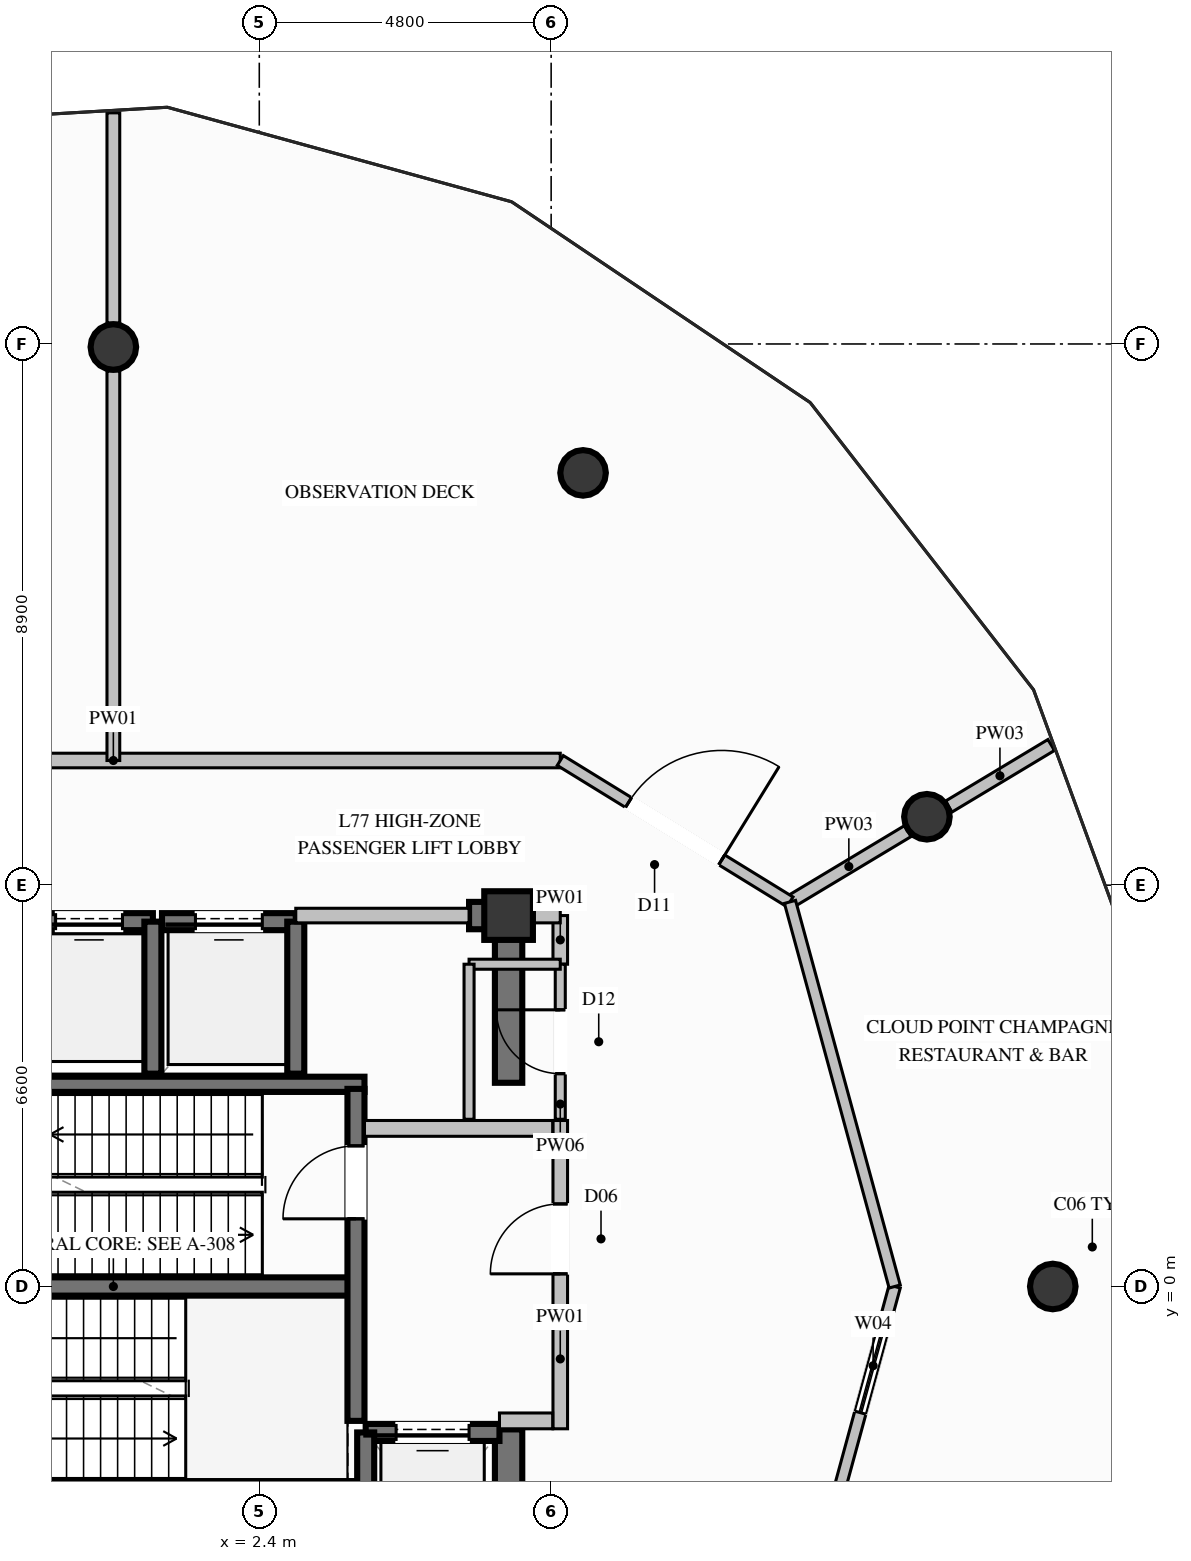
"""IFC4 building model, lengths in metres.
Left out: names, types, materials, properties, quantities, classifications, styles, units other than length and angle.
Written with IfcOpenShell. Run it as: python <this file> out.ifc"""

import sys

from ifc_helpers import new_model, si_unit, direction, frame, frame_2d, origin, origin_2d, place, context, subcontext, project, spatial, rectangle, circle, extrude, element, fill, save


model = new_model("IFC4")
c1 = context("Model", 3, precision=1e-05, world=origin(), true_north=direction((0.0, 1.0)))
c2 = subcontext(c1, "Body", "Model", "MODEL_VIEW")
j1 = project(units=[si_unit("LENGTHUNIT", "METRE"), si_unit("PLANEANGLEUNIT", "RADIAN")], contexts=[c1])
p1 = place(None, origin())
s1 = spatial("IfcSite", under=j1, at=p1, CompositionType="ELEMENT")
p2 = place(p1, origin())
s2 = spatial("IfcBuilding", under=s1, at=p2, CompositionType="ELEMENT")
p3 = place(p2, frame((0.0, 0.0, 297.2)))
s3 = spatial("IfcBuildingStorey", under=s2, at=p3, CompositionType="ELEMENT", Elevation=297.2)
p4 = place(p3, frame((6.5, 6.1, 0.0), z_axis=(0.0, 0.0, 1.0), x_axis=(1.0, 0.0, 0.0)))
e1 = element("IfcColumn", 1, at=p4, inside=s3, PredefinedType="COLUMN", context=c2, shape_type="SweptSolid", body=[
    extrude(rectangle(XDim=0.8, YDim=0.8, at=origin_2d()), origin(), (0.0, 0.0, 1.0), 5.0),
])
p5 = place(p3, frame((-3.99, 0.0, 0.0), z_axis=(0.0, 0.0, 1.0), x_axis=(1.0, 0.0, 0.0)))
e2 = element("IfcWall", 2, at=p5, inside=s3, PredefinedType="SHEAR", context=c2, shape_type="SweptSolid", body=[
    extrude(rectangle(XDim=7.98, YDim=0.3, at=frame_2d((3.99, 0.0))), origin(), (0.0, 0.0, 1.0), 5.0),
])
for number, where, z_axis, x_axis in (
    (3, (-4.13, -3.325, 0.0), (0.0, 0.0, 1.0), (1.0, 0.0, 0.0)),
    (4, (-4.13, 3.325, 0.0), (0.0, 0.0, 1.0), (1.0, 0.0, 0.0)),
):
    element("IfcWall", number, at=place(p3, frame(where, z_axis=z_axis, x_axis=x_axis)), inside=s3, PredefinedType="SOLIDWALL", context=c2, shape_type="SweptSolid", body=[
        extrude(rectangle(XDim=8.26, YDim=0.25, at=frame_2d((4.13, 0.0))), origin(), (0.0, 0.0, 1.0), 5.0),
    ])
p6 = place(p3, frame((5.85, 6.1, 0.0), z_axis=(0.0, 0.0, 1.0), x_axis=(1.0, 0.0, 0.0)))
e5 = element("IfcWall", 5, at=p6, inside=s3, PredefinedType="SHEAR", context=c2, shape_type="SweptSolid", body=[
    extrude(rectangle(XDim=0.425, YDim=0.45, at=frame_2d((0.212, 0.0))), origin(), (0.0, 0.0, 1.0), 5.0),
])
p7 = place(p3, frame((6.5, -6.325, 0.0), z_axis=(0.0, 0.0, 1.0), x_axis=(0.0, 1.0, 0.0)))
e6 = element("IfcWall", 6, at=p7, inside=s3, PredefinedType="SHEAR", context=c2, shape_type="SweptSolid", body=[
    extrude(rectangle(XDim=3.975, YDim=0.45, at=frame_2d((1.987, 0.0))), origin(), (0.0, 0.0, 1.0), 5.0),
])
p8 = place(p3, frame((6.5, 3.35, 0.0), z_axis=(0.0, 0.0, 1.0), x_axis=(0.0, 1.0, 0.0)))
e7 = element("IfcWall", 7, at=p8, inside=s3, PredefinedType="SHEAR", context=c2, shape_type="SweptSolid", body=[
    extrude(rectangle(XDim=2.975, YDim=0.45, at=frame_2d((1.487, 0.0))), origin(), (0.0, 0.0, 1.0), 5.0),
])
for number, where, z_axis, x_axis in (
    (8, (15.45, 0.0, 0.0), (0.0, 0.0, 1.0), (1.0, 0.0, 0.0)),
    (9, (13.38, 7.725, 0.0), (0.0, 0.0, 1.0), (1.0, 0.0, 0.0)),
    (10, (7.725, 13.38, 0.0), (0.0, 0.0, 1.0), (1.0, 0.0, 0.0)),
    (11, (0.0, 15.45, 0.0), (0.0, 0.0, 1.0), (1.0, 0.0, 0.0)),
):
    element("IfcColumn", number, at=place(p3, frame(where, z_axis=z_axis, x_axis=x_axis)), inside=s3, PredefinedType="COLUMN", context=c2, shape_type="SweptSolid", body=[
        extrude(circle(Radius=0.375, at=origin_2d()), origin(), (0.0, 0.0, 1.0), 5.0),
    ])
p9 = place(p3, frame((0.65, 6.0, 0.0), z_axis=(0.0, 0.0, 1.0), x_axis=(-1.0, 0.0, 0.0)))
e12 = element("IfcWall", 12, at=p9, inside=s3, PredefinedType="SOLIDWALL", context=c2, shape_type="SweptSolid", body=[
    extrude(rectangle(XDim=2.1, YDim=0.28, at=frame_2d((1.05, 0.0))), origin(), (0.0, 0.0, 1.0), 4.72),
])
p10 = place(p9, frame((0.5, 0.0, 0.0)))
e13 = element("IfcOpeningElement", 13, at=p10, cuts=e12, PredefinedType="OPENING", context=c2, shape_type="SweptSolid", body=[
    extrude(rectangle(XDim=1.1, YDim=2.2, at=frame_2d((0.55, 1.1))), frame((0.0, 0.15, 0.0), z_axis=(0.0, -1.0, 0.0), x_axis=(1.0, 0.0, 0.0)), (0.0, 0.0, 1.0), 0.3),
])
p11 = place(p3, frame((0.65, 3.5, 0.0), z_axis=(0.0, 0.0, 1.0), x_axis=(0.0, 1.0, 0.0)))
e14 = element("IfcWall", 14, at=p11, inside=s3, PredefinedType="SOLIDWALL", context=c2, shape_type="SweptSolid", body=[
    extrude(rectangle(XDim=2.5, YDim=0.28, at=frame_2d((1.25, 0.0))), origin(), (0.0, 0.0, 1.0), 4.72),
])
p12 = place(p3, frame((3.0, 6.0, 0.0), z_axis=(0.0, 0.0, 1.0), x_axis=(-1.0, 0.0, 0.0)))
e15 = element("IfcWall", 15, at=p12, inside=s3, PredefinedType="SOLIDWALL", context=c2, shape_type="SweptSolid", body=[
    extrude(rectangle(XDim=2.2, YDim=0.28, at=frame_2d((1.1, 0.0))), origin(), (0.0, 0.0, 1.0), 4.72),
])
p13 = place(p12, frame((0.55, 0.0, 0.0)))
e16 = element("IfcOpeningElement", 16, at=p13, cuts=e15, PredefinedType="OPENING", context=c2, shape_type="SweptSolid", body=[
    extrude(rectangle(XDim=1.1, YDim=2.2, at=frame_2d((0.55, 1.1))), frame((0.0, 0.15, 0.0), z_axis=(0.0, -1.0, 0.0), x_axis=(1.0, 0.0, 0.0)), (0.0, 0.0, 1.0), 0.3),
])
p14 = place(p3, frame((3.0, 3.5, 0.0), z_axis=(0.0, 0.0, 1.0), x_axis=(0.0, 1.0, 0.0)))
e17 = element("IfcWall", 17, at=p14, inside=s3, PredefinedType="SOLIDWALL", context=c2, shape_type="SweptSolid", body=[
    extrude(rectangle(XDim=2.5, YDim=0.28, at=frame_2d((1.25, 0.0))), origin(), (0.0, 0.0, 1.0), 4.72),
])
p15 = place(p3, frame((6.35, -2.4, 0.0), z_axis=(0.0, 0.0, 1.0), x_axis=(-1.0, 0.0, 0.0)))
e18 = element("IfcWall", 18, at=p15, inside=s3, PredefinedType="SOLIDWALL", context=c2, shape_type="SweptSolid", body=[
    extrude(rectangle(XDim=2.2, YDim=0.28, at=frame_2d((1.1, 0.0))), origin(), (0.0, 0.0, 1.0), 4.72),
])
p16 = place(p15, frame((0.5, 0.0, 0.0)))
e19 = element("IfcOpeningElement", 19, at=p16, cuts=e18, PredefinedType="OPENING", context=c2, shape_type="SweptSolid", body=[
    extrude(rectangle(XDim=1.2, YDim=2.2, at=frame_2d((0.6, 1.1))), frame((0.0, 0.15, 0.0), z_axis=(0.0, -1.0, 0.0), x_axis=(1.0, 0.0, 0.0)), (0.0, 0.0, 1.0), 0.3),
])
p17 = place(p3, frame((4.15, -2.4, 0.0), z_axis=(0.0, 0.0, 1.0), x_axis=(0.0, -1.0, 0.0)))
e20 = element("IfcWall", 20, at=p17, inside=s3, PredefinedType="SOLIDWALL", context=c2, shape_type="SweptSolid", body=[
    extrude(rectangle(XDim=2.7, YDim=0.28, at=frame_2d((1.35, 0.0))), origin(), (0.0, 0.0, 1.0), 4.72),
])
p18 = place(p3, frame((3.99, -2.21, 0.0), z_axis=(0.0, 0.0, 1.0), x_axis=(0.0, 1.0, 0.0)))
e21 = element("IfcWall", 21, at=p18, inside=s3, PredefinedType="SOLIDWALL", context=c2, shape_type="SweptSolid", body=[
    extrude(rectangle(XDim=5.46, YDim=0.28, at=frame_2d((2.73, 0.0))), origin(), (0.0, 0.0, 1.0), 4.72),
])
p19 = place(p18, frame((3.323, 0.0, 0.0)))
e22 = element("IfcOpeningElement", 22, at=p19, cuts=e21, PredefinedType="OPENING", context=c2, shape_type="SweptSolid", body=[
    extrude(rectangle(XDim=1.2, YDim=2.2, at=frame_2d((0.6, 1.1))), frame((0.0, 0.15, 0.0), z_axis=(0.0, -1.0, 0.0), x_axis=(1.0, 0.0, 0.0)), (0.0, 0.0, 1.0), 0.3),
])
p20 = place(p3, frame((7.35, -2.34, 0.0), z_axis=(0.0, 0.0, 1.0), x_axis=(0.0, 1.0, 0.0)))
e23 = element("IfcWall", 23, at=p20, inside=s3, PredefinedType="PARTITIONING", context=c2, shape_type="SweptSolid", body=[
    extrude(rectangle(XDim=5.07, YDim=0.24, at=frame_2d((2.535, 0.0))), origin(), (0.0, 0.0, 1.0), 2.905),
])
p21 = place(p20, frame((2.548, 0.0, 0.0)))
e24 = element("IfcOpeningElement", 24, at=p21, cuts=e23, PredefinedType="OPENING", context=c2, shape_type="SweptSolid", body=[
    extrude(rectangle(XDim=1.15, YDim=2.2, at=frame_2d((0.575, 1.1))), frame((0.0, 0.13, 0.0), z_axis=(0.0, -1.0, 0.0), x_axis=(1.0, 0.0, 0.0)), (0.0, 0.0, 1.0), 0.26),
])
p22 = place(p3, frame((6.35, -2.21, 0.0), z_axis=(0.0, 0.0, 1.0), x_axis=(1.0, 0.0, 0.0)))
e25 = element("IfcWall", 25, at=p22, inside=s3, PredefinedType="PARTITIONING", context=c2, shape_type="SweptSolid", body=[
    extrude(rectangle(XDim=0.875, YDim=0.26, at=frame_2d((0.438, 0.0))), origin(), (0.0, 0.0, 1.0), 4.72),
])
p23 = place(p3, frame((4.13, 2.6, 0.0), z_axis=(0.0, 0.0, 1.0), x_axis=(1.0, 0.0, 0.0)))
e26 = element("IfcWall", 26, at=p23, inside=s3, PredefinedType="PARTITIONING", context=c2, shape_type="SweptSolid", body=[
    extrude(rectangle(XDim=3.095, YDim=0.26, at=frame_2d((1.548, 0.0))), origin(), (0.0, 0.0, 1.0), 4.72),
])
p24 = place(p3, frame((-7.35, 8.65, 0.0), z_axis=(0.0, 0.0, 1.0), x_axis=(1.0, 0.0, 0.0)))
e27 = element("IfcWall", 27, at=p24, inside=s3, PredefinedType="PARTITIONING", context=c2, shape_type="SweptSolid", body=[
    extrude(rectangle(XDim=14.7, YDim=0.24, at=frame_2d((7.35, 0.0))), origin(), (0.0, 0.0, 1.0), 4.72),
])
p25 = place(p3, frame((3.0, 6.1, 0.0), z_axis=(0.0, 0.0, 1.0), x_axis=(1.0, 0.0, 0.0)))
e28 = element("IfcWall", 28, at=p25, inside=s3, PredefinedType="PARTITIONING", context=c2, shape_type="SweptSolid", body=[
    extrude(rectangle(XDim=2.85, YDim=0.24, at=frame_2d((1.425, 0.0))), origin(), (0.0, 0.0, 1.0), 2.905),
])
p26 = place(p3, frame((7.35, 5.3, 0.0), z_axis=(0.0, 0.0, 1.0), x_axis=(0.0, 1.0, 0.0)))
e29 = element("IfcWall", 29, at=p26, inside=s3, PredefinedType="PARTITIONING", context=c2, shape_type="SweptSolid", body=[
    extrude(rectangle(XDim=0.8, YDim=0.24, at=frame_2d((0.4, 0.0))), origin(), (0.0, 0.0, 1.0), 2.905),
])
p27 = place(p3, frame((6.5, 6.1, 0.0), z_axis=(0.0, 0.0, 1.0), x_axis=(1.0, 0.0, 0.0)))
e30 = element("IfcWall", 30, at=p27, inside=s3, PredefinedType="PARTITIONING", context=c2, shape_type="SweptSolid", body=[
    extrude(rectangle(XDim=0.85, YDim=0.24, at=frame_2d((0.425, 0.0))), origin(), (0.0, 0.0, 1.0), 4.72),
])
p28 = place(p3, frame((7.35, 2.75, 0.0), z_axis=(0.0, 0.0, 1.0), x_axis=(0.0, 1.0, 0.0)))
e31 = element("IfcWall", 31, at=p28, inside=s3, PredefinedType="PARTITIONING", context=c2, shape_type="SweptSolid", body=[
    extrude(rectangle(XDim=2.55, YDim=0.165, at=frame_2d((1.275, 0.0))), origin(), (0.0, 0.0, 1.0), 2.905),
])
p29 = place(p28, frame((0.75, 0.0, 0.0)))
e32 = element("IfcOpeningElement", 32, at=p29, cuts=e31, PredefinedType="OPENING", context=c2, shape_type="SweptSolid", body=[
    extrude(rectangle(XDim=1.05, YDim=2.15, at=frame_2d((0.525, 1.075))), frame((0.0, 0.093, 0.0), z_axis=(0.0, -1.0, 0.0), x_axis=(1.0, 0.0, 0.0)), (0.0, 0.0, 1.0), 0.185),
])
p30 = place(p3, frame((7.35, 5.3, 0.0), z_axis=(0.0, 0.0, 1.0), x_axis=(-1.0, 0.0, 0.0)))
e33 = element("IfcWall", 33, at=p30, inside=s3, PredefinedType="PARTITIONING", context=c2, shape_type="SweptSolid", body=[
    extrude(rectangle(XDim=1.5, YDim=0.165, at=frame_2d((0.75, 0.0))), origin(), (0.0, 0.0, 1.0), 2.905),
])
p31 = place(p3, frame((5.85, 5.3, 0.0), z_axis=(0.0, 0.0, 1.0), x_axis=(0.0, -1.0, 0.0)))
e34 = element("IfcWall", 34, at=p31, inside=s3, PredefinedType="PARTITIONING", context=c2, shape_type="SweptSolid", body=[
    extrude(rectangle(XDim=2.55, YDim=0.165, at=frame_2d((1.275, 0.0))), origin(), (0.0, 0.0, 1.0), 2.905),
])
p32 = place(p3, frame((11.128, 6.325, 0.0), z_axis=(0.0, 0.0, 1.0), x_axis=(0.857206654834, 0.514972572967, 0.0)))
e35 = element("IfcWall", 35, at=p32, inside=s3, PredefinedType="PARTITIONING", context=c2, shape_type="SweptSolid", body=[
    extrude(rectangle(XDim=2.259, YDim=0.21, at=frame_2d((1.129, 0.0))), origin(), (0.0, 0.0, 1.0), 2.905),
])
p33 = place(p3, frame((13.738, 7.892, 0.0), z_axis=(0.0, 0.0, 1.0), x_axis=(0.857197078032, 0.514988513865, 0.0)))
e36 = element("IfcWall", 36, at=p33, inside=s3, PredefinedType="PARTITIONING", context=c2, shape_type="SweptSolid", body=[
    extrude(rectangle(XDim=1.967, YDim=0.21, at=frame_2d((0.983, 0.0))), origin(), (0.0, 0.0, 1.0), 4.72),
])
p34 = place(p3, frame((7.35, 8.65, 0.0), z_axis=(0.0, 0.0, 1.0), x_axis=(0.851645088617, -0.524118920699, 0.0)))
e37 = element("IfcWall", 37, at=p34, inside=s3, PredefinedType="PARTITIONING", context=c2, shape_type="SweptSolid", body=[
    extrude(rectangle(XDim=4.436, YDim=0.19, at=frame_2d((2.218, 0.0))), origin(), (0.0, 0.0, 1.0), 4.72),
])
p35 = place(p34, frame((1.318, 0.0, 0.0)))
e38 = element("IfcOpeningElement", 38, at=p35, cuts=e37, PredefinedType="OPENING", context=c2, shape_type="SweptSolid", body=[
    extrude(rectangle(XDim=1.8, YDim=2.4, at=frame_2d((0.9, 1.2))), frame((0.0, 0.105, 0.0), z_axis=(0.0, -1.0, 0.0), x_axis=(1.0, 0.0, 0.0)), (0.0, 0.0, 1.0), 0.21),
])
p36 = place(p3, frame((0.0, 8.65, 0.0), z_axis=(0.0, 0.0, 1.0), x_axis=(0.0, 1.0, 0.0)))
e39 = element("IfcWall", 39, at=p36, inside=s3, PredefinedType="PARTITIONING", context=c2, shape_type="SweptSolid", body=[
    extrude(rectangle(XDim=6.405, YDim=0.21, at=frame_2d((3.203, 0.0))), origin(), (0.0, 0.0, 1.0), 2.905),
])
p37 = place(p3, frame((0.0, 15.845, 0.0), z_axis=(0.0, 0.0, 1.0), x_axis=(0.0, 1.0, 0.0)))
e40 = element("IfcWall", 40, at=p37, inside=s3, PredefinedType="PARTITIONING", context=c2, shape_type="SweptSolid", body=[
    extrude(rectangle(XDim=3.456, YDim=0.21, at=frame_2d((1.728, 0.0))), origin(), (0.0, 0.0, 1.0), 4.72),
])
p38 = place(p3, frame((11.128, -6.325, 0.0), z_axis=(0.0, 0.0, 1.0), x_axis=(0.262717156474, 0.964872890952, 0.0)))
e41 = element("IfcWall", 41, at=p38, inside=s3, PredefinedType="PARTITIONING", context=c2, shape_type="SweptSolid", body=[
    extrude(rectangle(XDim=6.555, YDim=0.19, at=frame_2d((3.278, 0.0))), origin(), (0.0, 0.0, 1.0), 4.72),
])
p39 = place(p38, frame((0.55, 0.0, 0.0)))
e42 = element("IfcOpeningElement", 42, at=p39, cuts=e41, PredefinedType="OPENING", context=c2, shape_type="SweptSolid", body=[
    extrude(rectangle(XDim=0.95, YDim=2.1, at=frame_2d((0.475, 1.05))), frame((0.0, 0.105, 0.0), z_axis=(0.0, -1.0, 0.0), x_axis=(1.0, 0.0, 0.0)), (0.0, 0.0, 1.0), 0.21),
])
p40 = place(p38, frame((4.405, 0.0, 0.9)))
e43 = element("IfcOpeningElement", 43, at=p40, cuts=e41, PredefinedType="OPENING", context=c2, shape_type="SweptSolid", body=[
    extrude(rectangle(XDim=1.6, YDim=1.4, at=frame_2d((0.8, 0.7))), frame((0.0, 0.105, 0.0), z_axis=(0.0, -1.0, 0.0), x_axis=(1.0, 0.0, 0.0)), (0.0, 0.0, 1.0), 0.21),
])
p41 = place(p3, frame((12.85, 0.0, 0.0), z_axis=(0.0, 0.0, 1.0), x_axis=(-0.262717156474, 0.964872890952, 0.0)))
e44 = element("IfcWall", 44, at=p41, inside=s3, PredefinedType="PARTITIONING", context=c2, shape_type="SweptSolid", body=[
    extrude(rectangle(XDim=6.555, YDim=0.19, at=frame_2d((3.278, 0.0))), origin(), (0.0, 0.0, 1.0), 4.72),
])
p42 = place(p10, origin())
e45 = element("IfcDoor", 45, at=p42, inside=s3, OperationType="SLIDING_TO_LEFT", PredefinedType="DOOR", context=c2, shape_type="SweptSolid", body=[
    extrude(rectangle(XDim=1.1, YDim=2.2, at=frame_2d((0.55, 1.1))), frame((0.0, 0.025, 0.0), z_axis=(0.0, -1.0, 0.0), x_axis=(1.0, 0.0, 0.0)), (0.0, 0.0, 1.0), 0.05),
])
fill(e13, e45)
p43 = place(p13, origin())
e46 = element("IfcDoor", 46, at=p43, inside=s3, OperationType="SLIDING_TO_LEFT", PredefinedType="DOOR", context=c2, shape_type="SweptSolid", body=[
    extrude(rectangle(XDim=1.1, YDim=2.2, at=frame_2d((0.55, 1.1))), frame((0.0, 0.025, 0.0), z_axis=(0.0, -1.0, 0.0), x_axis=(1.0, 0.0, 0.0)), (0.0, 0.0, 1.0), 0.05),
])
fill(e16, e46)
p44 = place(p16, origin())
e47 = element("IfcDoor", 47, at=p44, inside=s3, OperationType="SLIDING_TO_LEFT", PredefinedType="DOOR", context=c2, shape_type="SweptSolid", body=[
    extrude(rectangle(XDim=1.2, YDim=2.2, at=frame_2d((0.6, 1.1))), frame((0.0, 0.025, 0.0), z_axis=(0.0, -1.0, 0.0), x_axis=(1.0, 0.0, 0.0)), (0.0, 0.0, 1.0), 0.05),
])
fill(e19, e47)
p45 = place(p19, origin())
e48 = element("IfcDoor", 48, at=p45, inside=s3, OperationType="SINGLE_SWING_LEFT", PredefinedType="DOOR", context=c2, shape_type="SweptSolid", body=[
    extrude(rectangle(XDim=1.2, YDim=2.2, at=frame_2d((0.6, 1.1))), frame((0.0, 0.025, 0.0), z_axis=(0.0, -1.0, 0.0), x_axis=(1.0, 0.0, 0.0)), (0.0, 0.0, 1.0), 0.05),
])
fill(e22, e48)
p46 = place(p21, origin())
e49 = element("IfcDoor", 49, at=p46, inside=s3, OperationType="SINGLE_SWING_LEFT", PredefinedType="DOOR", context=c2, shape_type="SweptSolid", body=[
    extrude(rectangle(XDim=1.15, YDim=2.2, at=frame_2d((0.575, 1.1))), frame((0.0, 0.025, 0.0), z_axis=(0.0, -1.0, 0.0), x_axis=(1.0, 0.0, 0.0)), (0.0, 0.0, 1.0), 0.05),
])
fill(e24, e49)
p47 = place(p29, origin())
e50 = element("IfcDoor", 50, at=p47, inside=s3, OperationType="SINGLE_SWING_RIGHT", PredefinedType="DOOR", context=c2, shape_type="SweptSolid", body=[
    extrude(rectangle(XDim=1.05, YDim=2.15, at=frame_2d((0.525, 1.075))), frame((0.0, 0.025, 0.0), z_axis=(0.0, -1.0, 0.0), x_axis=(1.0, 0.0, 0.0)), (0.0, 0.0, 1.0), 0.05),
])
fill(e32, e50)
p48 = place(p35, origin())
e51 = element("IfcDoor", 51, at=p48, inside=s3, OperationType="SINGLE_SWING_RIGHT", PredefinedType="DOOR", context=c2, shape_type="SweptSolid", body=[
    extrude(rectangle(XDim=1.8, YDim=2.4, at=frame_2d((0.9, 1.2))), frame((0.0, 0.025, 0.0), z_axis=(0.0, -1.0, 0.0), x_axis=(1.0, 0.0, 0.0)), (0.0, 0.0, 1.0), 0.05),
])
fill(e38, e51)
p49 = place(p40, origin())
e52 = element("IfcWindow", 52, at=p49, inside=s3, PartitioningType="SINGLE_PANEL", PredefinedType="WINDOW", context=c2, shape_type="SweptSolid", body=[
    extrude(rectangle(XDim=1.6, YDim=1.4, at=frame_2d((0.8, 0.7))), frame((0.0, 0.03, 0.0), z_axis=(0.0, -1.0, 0.0), x_axis=(1.0, 0.0, 0.0)), (0.0, 0.0, 1.0), 0.06),
])
fill(e43, e52)
save(model, sys.argv[1])
